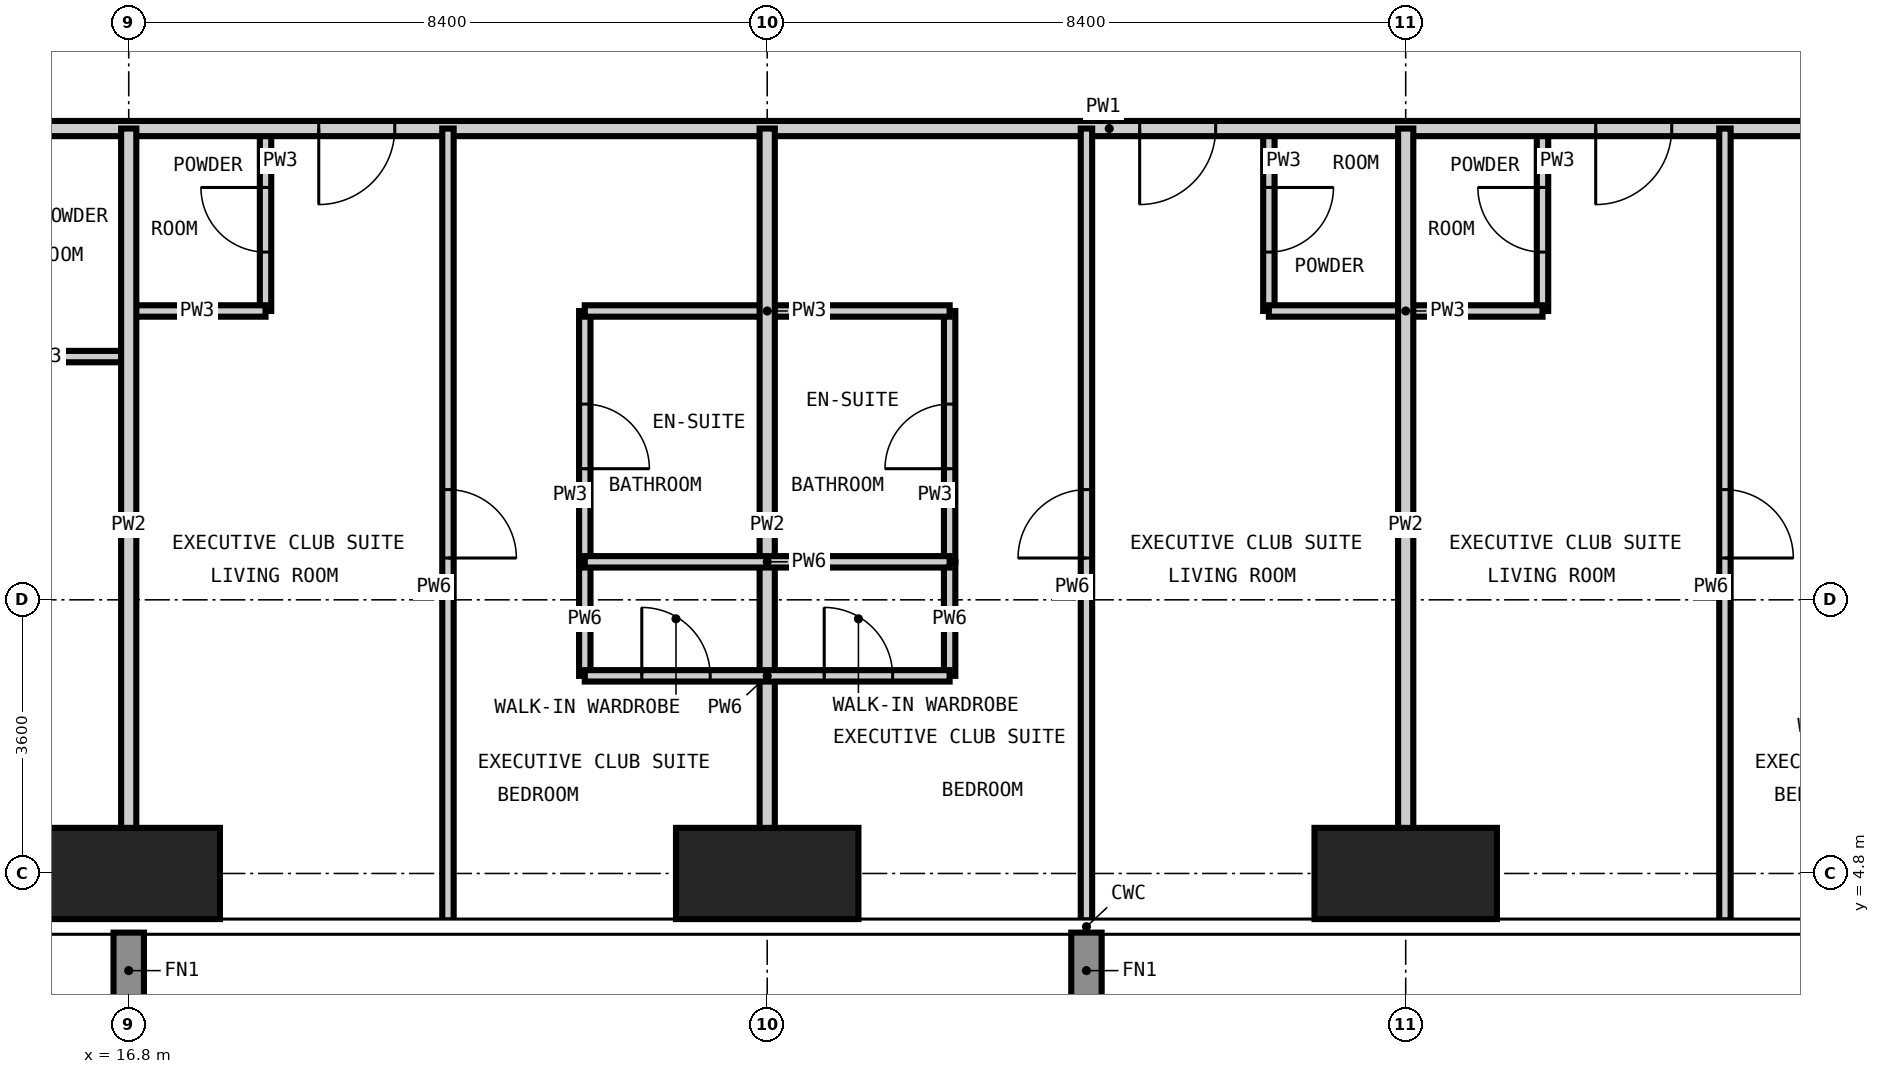
"""IFC4 building model, lengths in metres.
Left out: names, types, materials, properties, quantities, classifications, styles, units other than length and angle.
Written with IfcOpenShell. Run it as: python <this file> out.ifc"""

import sys

from ifc_helpers import new_model, si_unit, direction, frame, frame_2d, origin, origin_2d, place, context, subcontext, project, spatial, rectangle, extrude, element, fill, save


model = new_model("IFC4")
c1 = context("Model", 3, precision=1e-05, world=origin(), true_north=direction((0.0, 1.0)))
c2 = subcontext(c1, "Body", "Model", "MODEL_VIEW")
j1 = project(units=[si_unit("LENGTHUNIT", "METRE"), si_unit("PLANEANGLEUNIT", "RADIAN")], contexts=[c1])
p1 = place(None, origin())
s1 = spatial("IfcSite", under=j1, at=p1, CompositionType="ELEMENT")
p2 = place(p1, origin())
s2 = spatial("IfcBuilding", under=s1, at=p2, CompositionType="ELEMENT")
p3 = place(p2, frame((0.0, 0.0, 180.6)))
s3 = spatial("IfcBuildingStorey", under=s2, at=p3, CompositionType="ELEMENT", Elevation=180.6)
for number, where, z_axis, x_axis in (
    (1, (16.8, 4.8, -0.35), (0.0, 0.0, 1.0), (1.0, 0.0, 0.0)),
    (2, (25.2, 4.8, -0.35), (0.0, 0.0, 1.0), (1.0, 0.0, 0.0)),
    (3, (33.6, 4.8, -0.35), (0.0, 0.0, 1.0), (1.0, 0.0, 0.0)),
):
    element("IfcColumn", number, at=place(p3, frame(where, z_axis=z_axis, x_axis=x_axis)), inside=s3, PredefinedType="COLUMN", context=c2, shape_type="SweptSolid", body=[
        extrude(rectangle(XDim=2.4, YDim=1.2, at=origin_2d()), origin(), (0.0, 0.0, 1.0), 3.6),
    ])
p4 = place(p3, frame((18.6, 12.2, 0.0), z_axis=(0.0, 0.0, 1.0), x_axis=(0.0, 1.0, 0.0)))
e4 = element("IfcWall", 4, at=p4, inside=s3, PredefinedType="PARTITIONING", context=c2, shape_type="SweptSolid", body=[
    extrude(rectangle(XDim=2.4, YDim=0.15, at=frame_2d((1.2, 0.0))), origin(), (0.0, 0.0, 1.0), 3.25),
])
p5 = place(p4, frame((0.775, 0.0, 0.0)))
e5 = element("IfcOpeningElement", 5, at=p5, cuts=e4, PredefinedType="OPENING", context=c2, shape_type="SweptSolid", body=[
    extrude(rectangle(XDim=0.85, YDim=2.1, at=frame_2d((0.425, 1.05))), frame((0.0, 0.085, 0.0), z_axis=(0.0, -1.0, 0.0), x_axis=(1.0, 0.0, 0.0)), (0.0, 0.0, 1.0), 0.17),
])
p6 = place(p3, frame((22.8, 8.9, 0.0), z_axis=(0.0, 0.0, 1.0), x_axis=(0.0, 1.0, 0.0)))
e6 = element("IfcWall", 6, at=p6, inside=s3, PredefinedType="PARTITIONING", context=c2, shape_type="SweptSolid", body=[
    extrude(rectangle(XDim=3.3, YDim=0.15, at=frame_2d((1.65, 0.0))), origin(), (0.0, 0.0, 1.0), 3.25),
])
p7 = place(p6, frame((1.225, 0.0, 0.0)))
e7 = element("IfcOpeningElement", 7, at=p7, cuts=e6, PredefinedType="OPENING", context=c2, shape_type="SweptSolid", body=[
    extrude(rectangle(XDim=0.85, YDim=2.1, at=frame_2d((0.425, 1.05))), frame((0.0, 0.085, 0.0), z_axis=(0.0, -1.0, 0.0), x_axis=(1.0, 0.0, 0.0)), (0.0, 0.0, 1.0), 0.17),
])
p8 = place(p3, frame((27.6, 8.9, 0.0), z_axis=(0.0, 0.0, 1.0), x_axis=(0.0, 1.0, 0.0)))
e8 = element("IfcWall", 8, at=p8, inside=s3, PredefinedType="PARTITIONING", context=c2, shape_type="SweptSolid", body=[
    extrude(rectangle(XDim=3.3, YDim=0.15, at=frame_2d((1.65, 0.0))), origin(), (0.0, 0.0, 1.0), 3.25),
])
p9 = place(p8, frame((1.225, 0.0, 0.0)))
e9 = element("IfcOpeningElement", 9, at=p9, cuts=e8, PredefinedType="OPENING", context=c2, shape_type="SweptSolid", body=[
    extrude(rectangle(XDim=0.85, YDim=2.1, at=frame_2d((0.425, 1.05))), frame((0.0, 0.085, 0.0), z_axis=(0.0, -1.0, 0.0), x_axis=(1.0, 0.0, 0.0)), (0.0, 0.0, 1.0), 0.17),
])
p10 = place(p3, frame((31.8, 12.2, 0.0), z_axis=(0.0, 0.0, 1.0), x_axis=(0.0, 1.0, 0.0)))
e10 = element("IfcWall", 10, at=p10, inside=s3, PredefinedType="PARTITIONING", context=c2, shape_type="SweptSolid", body=[
    extrude(rectangle(XDim=2.4, YDim=0.15, at=frame_2d((1.2, 0.0))), origin(), (0.0, 0.0, 1.0), 3.25),
])
p11 = place(p10, frame((0.775, 0.0, 0.0)))
e11 = element("IfcOpeningElement", 11, at=p11, cuts=e10, PredefinedType="OPENING", context=c2, shape_type="SweptSolid", body=[
    extrude(rectangle(XDim=0.85, YDim=2.1, at=frame_2d((0.425, 1.05))), frame((0.0, 0.085, 0.0), z_axis=(0.0, -1.0, 0.0), x_axis=(1.0, 0.0, 0.0)), (0.0, 0.0, 1.0), 0.17),
])
p12 = place(p3, frame((35.4, 12.2, 0.0), z_axis=(0.0, 0.0, 1.0), x_axis=(0.0, 1.0, 0.0)))
e12 = element("IfcWall", 12, at=p12, inside=s3, PredefinedType="PARTITIONING", context=c2, shape_type="SweptSolid", body=[
    extrude(rectangle(XDim=2.4, YDim=0.15, at=frame_2d((1.2, 0.0))), origin(), (0.0, 0.0, 1.0), 3.25),
])
p13 = place(p12, frame((0.775, 0.0, 0.0)))
e13 = element("IfcOpeningElement", 13, at=p13, cuts=e12, PredefinedType="OPENING", context=c2, shape_type="SweptSolid", body=[
    extrude(rectangle(XDim=0.85, YDim=2.1, at=frame_2d((0.425, 1.05))), frame((0.0, 0.085, 0.0), z_axis=(0.0, -1.0, 0.0), x_axis=(1.0, 0.0, 0.0)), (0.0, 0.0, 1.0), 0.17),
])
p14 = place(p3, frame((14.6, 11.6, 0.0), z_axis=(0.0, 0.0, 1.0), x_axis=(1.0, 0.0, 0.0)))
e14 = element("IfcWall", 14, at=p14, inside=s3, PredefinedType="PARTITIONING", context=c2, shape_type="SweptSolid", body=[
    extrude(rectangle(XDim=2.2, YDim=0.15, at=frame_2d((1.1, 0.0))), origin(), (0.0, 0.0, 1.0), 3.25),
])
p15 = place(p3, frame((16.8, 12.2, 0.0), z_axis=(0.0, 0.0, 1.0), x_axis=(1.0, 0.0, 0.0)))
e15 = element("IfcWall", 15, at=p15, inside=s3, PredefinedType="PARTITIONING", context=c2, shape_type="SweptSolid", body=[
    extrude(rectangle(XDim=1.8, YDim=0.15, at=frame_2d((0.9, 0.0))), origin(), (0.0, 0.0, 1.0), 3.25),
])
p16 = place(p3, frame((22.8, 12.2, 0.0), z_axis=(0.0, 0.0, 1.0), x_axis=(1.0, 0.0, 0.0)))
e16 = element("IfcWall", 16, at=p16, inside=s3, PredefinedType="PARTITIONING", context=c2, shape_type="SweptSolid", body=[
    extrude(rectangle(XDim=4.8, YDim=0.15, at=frame_2d((2.4, 0.0))), origin(), (0.0, 0.0, 1.0), 3.25),
])
p17 = place(p3, frame((31.8, 12.2, 0.0), z_axis=(0.0, 0.0, 1.0), x_axis=(1.0, 0.0, 0.0)))
e17 = element("IfcWall", 17, at=p17, inside=s3, PredefinedType="PARTITIONING", context=c2, shape_type="SweptSolid", body=[
    extrude(rectangle(XDim=3.6, YDim=0.15, at=frame_2d((1.8, 0.0))), origin(), (0.0, 0.0, 1.0), 3.25),
])
p18 = place(p3, frame((44.8, 14.6, 0.0), z_axis=(0.0, 0.0, 1.0), x_axis=(-1.0, 0.0, 0.0)))
e18 = element("IfcWall", 18, at=p18, inside=s3, PredefinedType="PARTITIONING", context=c2, shape_type="SweptSolid", body=[
    extrude(rectangle(XDim=30.2, YDim=0.2, at=frame_2d((15.1, 0.0))), origin(), (0.0, 0.0, 1.0), 3.25),
])
p19 = place(p18, frame((24.5, 0.0, 0.0)))
e19 = element("IfcOpeningElement", 19, at=p19, cuts=e18, PredefinedType="OPENING", context=c2, shape_type="SweptSolid", body=[
    extrude(rectangle(XDim=1.0, YDim=2.2, at=frame_2d((0.5, 1.1))), frame((0.0, 0.11, 0.0), z_axis=(0.0, -1.0, 0.0), x_axis=(1.0, 0.0, 0.0)), (0.0, 0.0, 1.0), 0.22),
])
p20 = place(p18, frame((13.7, 0.0, 0.0)))
e20 = element("IfcOpeningElement", 20, at=p20, cuts=e18, PredefinedType="OPENING", context=c2, shape_type="SweptSolid", body=[
    extrude(rectangle(XDim=1.0, YDim=2.2, at=frame_2d((0.5, 1.1))), frame((0.0, 0.11, 0.0), z_axis=(0.0, -1.0, 0.0), x_axis=(1.0, 0.0, 0.0)), (0.0, 0.0, 1.0), 0.22),
])
p21 = place(p18, frame((7.7, 0.0, 0.0)))
e21 = element("IfcOpeningElement", 21, at=p21, cuts=e18, PredefinedType="OPENING", context=c2, shape_type="SweptSolid", body=[
    extrude(rectangle(XDim=1.0, YDim=2.2, at=frame_2d((0.5, 1.1))), frame((0.0, 0.11, 0.0), z_axis=(0.0, -1.0, 0.0), x_axis=(1.0, 0.0, 0.0)), (0.0, 0.0, 1.0), 0.22),
])
for number, where, z_axis, x_axis in (
    (22, (16.8, 4.182, 0.0), (0.0, 0.0, 1.0), (0.0, 1.0, 0.0)),
    (23, (25.2, 4.182, 0.0), (0.0, 0.0, 1.0), (0.0, 1.0, 0.0)),
    (24, (33.6, 4.182, 0.0), (0.0, 0.0, 1.0), (0.0, 1.0, 0.0)),
):
    element("IfcWall", number, at=place(p3, frame(where, z_axis=z_axis, x_axis=x_axis)), inside=s3, PredefinedType="PARTITIONING", context=c2, shape_type="SweptSolid", body=[
        extrude(rectangle(XDim=10.418, YDim=0.2, at=frame_2d((5.209, 0.0))), origin(), (0.0, 0.0, 1.0), 3.25),
    ])
p22 = place(p3, frame((21.0, 4.182, 0.0), z_axis=(0.0, 0.0, 1.0), x_axis=(0.0, 1.0, 0.0)))
e25 = element("IfcWall", 25, at=p22, inside=s3, PredefinedType="PARTITIONING", context=c2, shape_type="SweptSolid", body=[
    extrude(rectangle(XDim=10.418, YDim=0.15, at=frame_2d((5.209, 0.0))), origin(), (0.0, 0.0, 1.0), 3.25),
])
p23 = place(p22, frame((4.768, 0.0, 0.0)))
e26 = element("IfcOpeningElement", 26, at=p23, cuts=e25, PredefinedType="OPENING", context=c2, shape_type="SweptSolid", body=[
    extrude(rectangle(XDim=0.9, YDim=2.1, at=frame_2d((0.45, 1.05))), frame((0.0, 0.085, 0.0), z_axis=(0.0, -1.0, 0.0), x_axis=(1.0, 0.0, 0.0)), (0.0, 0.0, 1.0), 0.17),
])
for number, where, z_axis, x_axis in (
    (27, (22.8, 7.4, 0.0), (0.0, 0.0, 1.0), (0.0, 1.0, 0.0)),
    (28, (27.6, 7.4, 0.0), (0.0, 0.0, 1.0), (0.0, 1.0, 0.0)),
):
    element("IfcWall", number, at=place(p3, frame(where, z_axis=z_axis, x_axis=x_axis)), inside=s3, PredefinedType="PARTITIONING", context=c2, shape_type="SweptSolid", body=[
        extrude(rectangle(XDim=1.5, YDim=0.15, at=frame_2d((0.75, 0.0))), origin(), (0.0, 0.0, 1.0), 3.25),
    ])
p24 = place(p3, frame((29.4, 4.182, 0.0), z_axis=(0.0, 0.0, 1.0), x_axis=(0.0, 1.0, 0.0)))
e29 = element("IfcWall", 29, at=p24, inside=s3, PredefinedType="PARTITIONING", context=c2, shape_type="SweptSolid", body=[
    extrude(rectangle(XDim=10.418, YDim=0.15, at=frame_2d((5.209, 0.0))), origin(), (0.0, 0.0, 1.0), 3.25),
])
p25 = place(p24, frame((4.768, 0.0, 0.0)))
e30 = element("IfcOpeningElement", 30, at=p25, cuts=e29, PredefinedType="OPENING", context=c2, shape_type="SweptSolid", body=[
    extrude(rectangle(XDim=0.9, YDim=2.1, at=frame_2d((0.45, 1.05))), frame((0.0, 0.085, 0.0), z_axis=(0.0, -1.0, 0.0), x_axis=(1.0, 0.0, 0.0)), (0.0, 0.0, 1.0), 0.17),
])
p26 = place(p3, frame((37.8, 4.182, 0.0), z_axis=(0.0, 0.0, 1.0), x_axis=(0.0, 1.0, 0.0)))
e31 = element("IfcWall", 31, at=p26, inside=s3, PredefinedType="PARTITIONING", context=c2, shape_type="SweptSolid", body=[
    extrude(rectangle(XDim=10.418, YDim=0.15, at=frame_2d((5.209, 0.0))), origin(), (0.0, 0.0, 1.0), 3.25),
])
p27 = place(p26, frame((4.768, 0.0, 0.0)))
e32 = element("IfcOpeningElement", 32, at=p27, cuts=e31, PredefinedType="OPENING", context=c2, shape_type="SweptSolid", body=[
    extrude(rectangle(XDim=0.9, YDim=2.1, at=frame_2d((0.45, 1.05))), frame((0.0, 0.085, 0.0), z_axis=(0.0, -1.0, 0.0), x_axis=(1.0, 0.0, 0.0)), (0.0, 0.0, 1.0), 0.17),
])
p28 = place(p3, frame((22.8, 7.4, 0.0), z_axis=(0.0, 0.0, 1.0), x_axis=(1.0, 0.0, 0.0)))
e33 = element("IfcWall", 33, at=p28, inside=s3, PredefinedType="PARTITIONING", context=c2, shape_type="SweptSolid", body=[
    extrude(rectangle(XDim=4.8, YDim=0.15, at=frame_2d((2.4, 0.0))), origin(), (0.0, 0.0, 1.0), 3.25),
])
p29 = place(p28, frame((0.75, 0.0, 0.0)))
e34 = element("IfcOpeningElement", 34, at=p29, cuts=e33, PredefinedType="OPENING", context=c2, shape_type="SweptSolid", body=[
    extrude(rectangle(XDim=0.9, YDim=2.1, at=frame_2d((0.45, 1.05))), frame((0.0, 0.085, 0.0), z_axis=(0.0, -1.0, 0.0), x_axis=(1.0, 0.0, 0.0)), (0.0, 0.0, 1.0), 0.17),
])
p30 = place(p28, frame((3.15, 0.0, 0.0)))
e35 = element("IfcOpeningElement", 35, at=p30, cuts=e33, PredefinedType="OPENING", context=c2, shape_type="SweptSolid", body=[
    extrude(rectangle(XDim=0.9, YDim=2.1, at=frame_2d((0.45, 1.05))), frame((0.0, 0.085, 0.0), z_axis=(0.0, -1.0, 0.0), x_axis=(1.0, 0.0, 0.0)), (0.0, 0.0, 1.0), 0.17),
])
p31 = place(p3, frame((22.8, 8.9, 0.0), z_axis=(0.0, 0.0, 1.0), x_axis=(1.0, 0.0, 0.0)))
e36 = element("IfcWall", 36, at=p31, inside=s3, PredefinedType="PARTITIONING", context=c2, shape_type="SweptSolid", body=[
    extrude(rectangle(XDim=4.8, YDim=0.15, at=frame_2d((2.4, 0.0))), origin(), (0.0, 0.0, 1.0), 3.25),
])
p32 = place(p19, origin())
e37 = element("IfcDoor", 37, at=p32, inside=s3, OperationType="SINGLE_SWING_RIGHT", PredefinedType="DOOR", context=c2, shape_type="SweptSolid", body=[
    extrude(rectangle(XDim=1.0, YDim=2.2, at=frame_2d((0.5, 1.1))), frame((0.0, 0.025, 0.0), z_axis=(0.0, -1.0, 0.0), x_axis=(1.0, 0.0, 0.0)), (0.0, 0.0, 1.0), 0.05),
])
fill(e19, e37)
p33 = place(p5, origin())
e38 = element("IfcDoor", 38, at=p33, inside=s3, OperationType="SINGLE_SWING_RIGHT", PredefinedType="DOOR", context=c2, shape_type="SweptSolid", body=[
    extrude(rectangle(XDim=0.85, YDim=2.1, at=frame_2d((0.425, 1.05))), frame((0.0, 0.025, 0.0), z_axis=(0.0, -1.0, 0.0), x_axis=(1.0, 0.0, 0.0)), (0.0, 0.0, 1.0), 0.05),
])
fill(e5, e38)
p34 = place(p23, frame((0.9, 0.0, 0.0), z_axis=(0.0, 0.0, 1.0), x_axis=(-1.0, 0.0, 0.0)))
e39 = element("IfcDoor", 39, at=p34, inside=s3, OperationType="SINGLE_SWING_RIGHT", PredefinedType="DOOR", context=c2, shape_type="SweptSolid", body=[
    extrude(rectangle(XDim=0.9, YDim=2.1, at=frame_2d((0.45, 1.05))), frame((0.0, 0.025, 0.0), z_axis=(0.0, -1.0, 0.0), x_axis=(1.0, 0.0, 0.0)), (0.0, 0.0, 1.0), 0.05),
])
fill(e26, e39)
p35 = place(p7, frame((0.85, 0.0, 0.0), z_axis=(0.0, 0.0, 1.0), x_axis=(-1.0, 0.0, 0.0)))
e40 = element("IfcDoor", 40, at=p35, inside=s3, OperationType="SINGLE_SWING_RIGHT", PredefinedType="DOOR", context=c2, shape_type="SweptSolid", body=[
    extrude(rectangle(XDim=0.85, YDim=2.1, at=frame_2d((0.425, 1.05))), frame((0.0, 0.025, 0.0), z_axis=(0.0, -1.0, 0.0), x_axis=(1.0, 0.0, 0.0)), (0.0, 0.0, 1.0), 0.05),
])
fill(e7, e40)
p36 = place(p29, origin())
e41 = element("IfcDoor", 41, at=p36, inside=s3, OperationType="SINGLE_SWING_LEFT", PredefinedType="DOOR", context=c2, shape_type="SweptSolid", body=[
    extrude(rectangle(XDim=0.9, YDim=2.1, at=frame_2d((0.45, 1.05))), frame((0.0, 0.025, 0.0), z_axis=(0.0, -1.0, 0.0), x_axis=(1.0, 0.0, 0.0)), (0.0, 0.0, 1.0), 0.05),
])
fill(e34, e41)
p37 = place(p20, origin())
e42 = element("IfcDoor", 42, at=p37, inside=s3, OperationType="SINGLE_SWING_RIGHT", PredefinedType="DOOR", context=c2, shape_type="SweptSolid", body=[
    extrude(rectangle(XDim=1.0, YDim=2.2, at=frame_2d((0.5, 1.1))), frame((0.0, 0.025, 0.0), z_axis=(0.0, -1.0, 0.0), x_axis=(1.0, 0.0, 0.0)), (0.0, 0.0, 1.0), 0.05),
])
fill(e20, e42)
p38 = place(p11, frame((0.85, 0.0, 0.0), z_axis=(0.0, 0.0, 1.0), x_axis=(-1.0, 0.0, 0.0)))
e43 = element("IfcDoor", 43, at=p38, inside=s3, OperationType="SINGLE_SWING_LEFT", PredefinedType="DOOR", context=c2, shape_type="SweptSolid", body=[
    extrude(rectangle(XDim=0.85, YDim=2.1, at=frame_2d((0.425, 1.05))), frame((0.0, 0.025, 0.0), z_axis=(0.0, -1.0, 0.0), x_axis=(1.0, 0.0, 0.0)), (0.0, 0.0, 1.0), 0.05),
])
fill(e11, e43)
p39 = place(p25, origin())
e44 = element("IfcDoor", 44, at=p39, inside=s3, OperationType="SINGLE_SWING_LEFT", PredefinedType="DOOR", context=c2, shape_type="SweptSolid", body=[
    extrude(rectangle(XDim=0.9, YDim=2.1, at=frame_2d((0.45, 1.05))), frame((0.0, 0.025, 0.0), z_axis=(0.0, -1.0, 0.0), x_axis=(1.0, 0.0, 0.0)), (0.0, 0.0, 1.0), 0.05),
])
fill(e30, e44)
p40 = place(p9, origin())
e45 = element("IfcDoor", 45, at=p40, inside=s3, OperationType="SINGLE_SWING_LEFT", PredefinedType="DOOR", context=c2, shape_type="SweptSolid", body=[
    extrude(rectangle(XDim=0.85, YDim=2.1, at=frame_2d((0.425, 1.05))), frame((0.0, 0.025, 0.0), z_axis=(0.0, -1.0, 0.0), x_axis=(1.0, 0.0, 0.0)), (0.0, 0.0, 1.0), 0.05),
])
fill(e9, e45)
p41 = place(p30, origin())
e46 = element("IfcDoor", 46, at=p41, inside=s3, OperationType="SINGLE_SWING_LEFT", PredefinedType="DOOR", context=c2, shape_type="SweptSolid", body=[
    extrude(rectangle(XDim=0.9, YDim=2.1, at=frame_2d((0.45, 1.05))), frame((0.0, 0.025, 0.0), z_axis=(0.0, -1.0, 0.0), x_axis=(1.0, 0.0, 0.0)), (0.0, 0.0, 1.0), 0.05),
])
fill(e35, e46)
p42 = place(p21, origin())
e47 = element("IfcDoor", 47, at=p42, inside=s3, OperationType="SINGLE_SWING_RIGHT", PredefinedType="DOOR", context=c2, shape_type="SweptSolid", body=[
    extrude(rectangle(XDim=1.0, YDim=2.2, at=frame_2d((0.5, 1.1))), frame((0.0, 0.025, 0.0), z_axis=(0.0, -1.0, 0.0), x_axis=(1.0, 0.0, 0.0)), (0.0, 0.0, 1.0), 0.05),
])
fill(e21, e47)
p43 = place(p13, origin())
e48 = element("IfcDoor", 48, at=p43, inside=s3, OperationType="SINGLE_SWING_RIGHT", PredefinedType="DOOR", context=c2, shape_type="SweptSolid", body=[
    extrude(rectangle(XDim=0.85, YDim=2.1, at=frame_2d((0.425, 1.05))), frame((0.0, 0.025, 0.0), z_axis=(0.0, -1.0, 0.0), x_axis=(1.0, 0.0, 0.0)), (0.0, 0.0, 1.0), 0.05),
])
fill(e13, e48)
p44 = place(p27, frame((0.9, 0.0, 0.0), z_axis=(0.0, 0.0, 1.0), x_axis=(-1.0, 0.0, 0.0)))
e49 = element("IfcDoor", 49, at=p44, inside=s3, OperationType="SINGLE_SWING_RIGHT", PredefinedType="DOOR", context=c2, shape_type="SweptSolid", body=[
    extrude(rectangle(XDim=0.9, YDim=2.1, at=frame_2d((0.45, 1.05))), frame((0.0, 0.025, 0.0), z_axis=(0.0, -1.0, 0.0), x_axis=(1.0, 0.0, 0.0)), (0.0, 0.0, 1.0), 0.05),
])
fill(e32, e49)
save(model, sys.argv[1])
